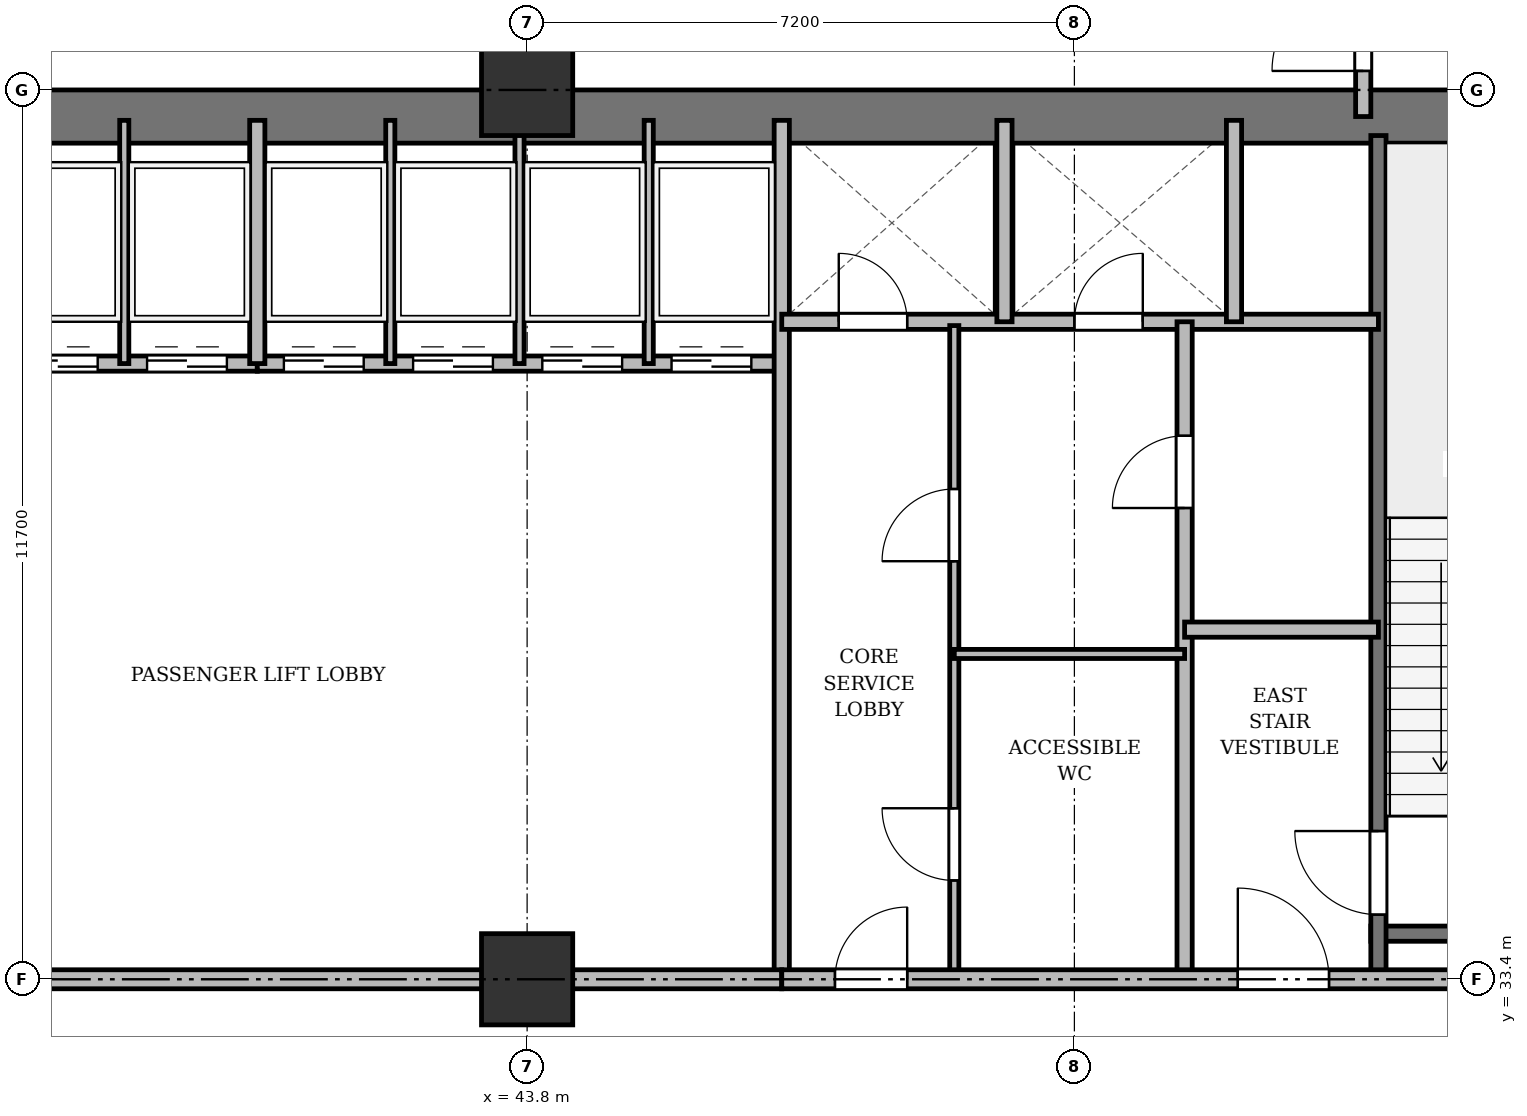
"""IFC4 building model, lengths in metres.
Left out: names, types, materials, properties, quantities, classifications, styles, units other than length and angle.
Written with IfcOpenShell. Run it as: python <this file> out.ifc"""

import sys

from ifc_helpers import new_model, si_unit, direction, frame, frame_2d, origin, origin_2d, place, context, subcontext, project, spatial, rectangle, extrude, source, transform, mapped, element, fill, save


model = new_model("IFC4")
c1 = context("Model", 3, precision=1e-05, world=origin(), true_north=direction((0.0, 1.0)))
c2 = subcontext(c1, "Body", "Model", "MODEL_VIEW")
j1 = project(units=[si_unit("LENGTHUNIT", "METRE"), si_unit("PLANEANGLEUNIT", "RADIAN")], contexts=[c1])
p1 = place(None, origin())
s1 = spatial("IfcSite", under=j1, at=p1, CompositionType="ELEMENT")
p2 = place(p1, origin())
s2 = spatial("IfcBuilding", under=s1, at=p2, CompositionType="ELEMENT")
p3 = place(p2, origin())
s3 = spatial("IfcBuildingStorey", under=s2, at=p3, CompositionType="ELEMENT", Elevation=0.0)
m1 = source(origin(), c2, "Body", "SweptSolid", [
    extrude(rectangle(XDim=1.2, YDim=1.2, at=origin_2d()), origin(), (0.0, 0.0, 1.0), 5.2),
])
for number, where, z_axis, x_axis in (
    (1, (43.8, 33.4, 0.0), (0.0, 0.0, 1.0), (1.0, 0.0, 0.0)),
    (2, (43.8, 45.1, 0.0), (0.0, 0.0, 1.0), (1.0, 0.0, 0.0)),
):
    element("IfcColumn", number, at=place(p3, frame(where, z_axis=z_axis, x_axis=x_axis)), inside=s3, PredefinedType="COLUMN", context=c2, shape_type="MappedRepresentation", body=[
        mapped(m1, transform((0.0, 0.0, 0.0), x_axis=(1.0, 0.0, 0.0), y_axis=(0.0, 1.0, 0.0), z_axis=(0.0, 0.0, 1.0), scale=1.0)),
    ])
p4 = place(p3, frame((15.5, 44.75, 0.0), z_axis=(0.0, 0.0, 1.0), x_axis=(1.0, 0.0, 0.0)))
e3 = element("IfcWall", 3, at=p4, inside=s3, PredefinedType="SHEAR", context=c2, shape_type="SweptSolid", body=[
    extrude(rectangle(XDim=43.4, YDim=0.7, at=frame_2d((21.7, 0.0))), origin(), (0.0, 0.0, 1.0), 4.88),
])
p5 = place(p3, frame((54.9, 34.0, 0.0), z_axis=(0.0, 0.0, 1.0), x_axis=(1.0, 0.0, 0.0)))
e4 = element("IfcWall", 4, at=p5, inside=s3, PredefinedType="SHEAR", context=c2, shape_type="SweptSolid", body=[
    extrude(rectangle(XDim=3.4, YDim=0.2, at=frame_2d((1.7, 0.0))), origin(), (0.0, 0.0, 1.0), 4.88),
])
p6 = place(p3, frame((55.0, 33.4, 0.0), z_axis=(0.0, 0.0, 1.0), x_axis=(0.0, 1.0, 0.0)))
e5 = element("IfcWall", 5, at=p6, inside=s3, PredefinedType="SHEAR", context=c2, shape_type="SweptSolid", body=[
    extrude(rectangle(XDim=11.1, YDim=0.2, at=frame_2d((5.55, 0.0))), origin(), (0.0, 0.0, 1.0), 4.88),
])
p7 = place(p6, frame((0.85, 0.0, 0.0)))
e6 = element("IfcOpeningElement", 6, at=p7, cuts=e5, PredefinedType="OPENING", context=c2, shape_type="SweptSolid", body=[
    extrude(rectangle(XDim=1.1, YDim=2.15, at=frame_2d((0.55, 1.075))), frame((0.0, 0.11, 0.0), z_axis=(0.0, -1.0, 0.0), x_axis=(1.0, 0.0, 0.0)), (0.0, 0.0, 1.0), 0.22),
])
p8 = place(p3, frame((33.35, 41.5, 0.0), z_axis=(0.0, 0.0, 1.0), x_axis=(1.0, 0.0, 0.0)))
e7 = element("IfcWall", 7, at=p8, inside=s3, PredefinedType="SOLIDWALL", context=c2, shape_type="SweptSolid", body=[
    extrude(rectangle(XDim=6.9, YDim=0.2, at=frame_2d((3.45, 0.0))), origin(), (0.0, 0.0, 1.0), 4.88),
])
p9 = place(p8, frame((0.35, 0.0, 0.0)))
e8 = element("IfcOpeningElement", 8, at=p9, cuts=e7, PredefinedType="OPENING", context=c2, shape_type="SweptSolid", body=[
    extrude(rectangle(XDim=1.05, YDim=2.15, at=frame_2d((0.525, 1.075))), frame((0.0, 0.11, 0.0), z_axis=(0.0, -1.0, 0.0), x_axis=(1.0, 0.0, 0.0)), (0.0, 0.0, 1.0), 0.22),
])
p10 = place(p8, frame((2.05, 0.0, 0.0)))
e9 = element("IfcOpeningElement", 9, at=p10, cuts=e7, PredefinedType="OPENING", context=c2, shape_type="SweptSolid", body=[
    extrude(rectangle(XDim=1.05, YDim=2.15, at=frame_2d((0.525, 1.075))), frame((0.0, 0.11, 0.0), z_axis=(0.0, -1.0, 0.0), x_axis=(1.0, 0.0, 0.0)), (0.0, 0.0, 1.0), 0.22),
])
p11 = place(p8, frame((3.75, 0.0, 0.0)))
e10 = element("IfcOpeningElement", 10, at=p11, cuts=e7, PredefinedType="OPENING", context=c2, shape_type="SweptSolid", body=[
    extrude(rectangle(XDim=1.05, YDim=2.15, at=frame_2d((0.525, 1.075))), frame((0.0, 0.11, 0.0), z_axis=(0.0, -1.0, 0.0), x_axis=(1.0, 0.0, 0.0)), (0.0, 0.0, 1.0), 0.22),
])
p12 = place(p8, frame((5.45, 0.0, 0.0)))
e11 = element("IfcOpeningElement", 11, at=p12, cuts=e7, PredefinedType="OPENING", context=c2, shape_type="SweptSolid", body=[
    extrude(rectangle(XDim=1.05, YDim=2.15, at=frame_2d((0.525, 1.075))), frame((0.0, 0.11, 0.0), z_axis=(0.0, -1.0, 0.0), x_axis=(1.0, 0.0, 0.0)), (0.0, 0.0, 1.0), 0.22),
])
p13 = place(p3, frame((38.5, 41.5, 0.0), z_axis=(0.0, 0.0, 1.0), x_axis=(0.0, 1.0, 0.0)))
e12 = element("IfcWall", 12, at=p13, inside=s3, PredefinedType="PARTITIONING", context=c2, shape_type="SweptSolid", body=[
    extrude(rectangle(XDim=3.2, YDim=0.12, at=frame_2d((1.6, 0.0))), origin(), (0.0, 0.0, 1.0), 4.88),
])
p14 = place(p3, frame((40.25, 41.5, 0.0), z_axis=(0.0, 0.0, 1.0), x_axis=(1.0, 0.0, 0.0)))
e13 = element("IfcWall", 13, at=p14, inside=s3, PredefinedType="SOLIDWALL", context=c2, shape_type="SweptSolid", body=[
    extrude(rectangle(XDim=6.9, YDim=0.2, at=frame_2d((3.45, 0.0))), origin(), (0.0, 0.0, 1.0), 4.08),
])
p15 = place(p14, frame((0.35, 0.0, 0.0)))
e14 = element("IfcOpeningElement", 14, at=p15, cuts=e13, PredefinedType="OPENING", context=c2, shape_type="SweptSolid", body=[
    extrude(rectangle(XDim=1.05, YDim=2.15, at=frame_2d((0.525, 1.075))), frame((0.0, 0.11, 0.0), z_axis=(0.0, -1.0, 0.0), x_axis=(1.0, 0.0, 0.0)), (0.0, 0.0, 1.0), 0.22),
])
p16 = place(p14, frame((2.05, 0.0, 0.0)))
e15 = element("IfcOpeningElement", 15, at=p16, cuts=e13, PredefinedType="OPENING", context=c2, shape_type="SweptSolid", body=[
    extrude(rectangle(XDim=1.05, YDim=2.15, at=frame_2d((0.525, 1.075))), frame((0.0, 0.11, 0.0), z_axis=(0.0, -1.0, 0.0), x_axis=(1.0, 0.0, 0.0)), (0.0, 0.0, 1.0), 0.22),
])
p17 = place(p14, frame((3.75, 0.0, 0.0)))
e16 = element("IfcOpeningElement", 16, at=p17, cuts=e13, PredefinedType="OPENING", context=c2, shape_type="SweptSolid", body=[
    extrude(rectangle(XDim=1.05, YDim=2.15, at=frame_2d((0.525, 1.075))), frame((0.0, 0.11, 0.0), z_axis=(0.0, -1.0, 0.0), x_axis=(1.0, 0.0, 0.0)), (0.0, 0.0, 1.0), 0.22),
])
p18 = place(p14, frame((5.45, 0.0, 0.0)))
e17 = element("IfcOpeningElement", 17, at=p18, cuts=e13, PredefinedType="OPENING", context=c2, shape_type="SweptSolid", body=[
    extrude(rectangle(XDim=1.05, YDim=2.15, at=frame_2d((0.525, 1.075))), frame((0.0, 0.11, 0.0), z_axis=(0.0, -1.0, 0.0), x_axis=(1.0, 0.0, 0.0)), (0.0, 0.0, 1.0), 0.22),
])
p19 = place(p3, frame((40.25, 41.5, 0.0), z_axis=(0.0, 0.0, 1.0), x_axis=(0.0, 1.0, 0.0)))
e18 = element("IfcWall", 18, at=p19, inside=s3, PredefinedType="SOLIDWALL", context=c2, shape_type="SweptSolid", body=[
    extrude(rectangle(XDim=3.2, YDim=0.2, at=frame_2d((1.6, 0.0))), origin(), (0.0, 0.0, 1.0), 4.88),
])
p20 = place(p3, frame((42.0, 41.5, 0.0), z_axis=(0.0, 0.0, 1.0), x_axis=(0.0, 1.0, 0.0)))
e19 = element("IfcWall", 19, at=p20, inside=s3, PredefinedType="PARTITIONING", context=c2, shape_type="SweptSolid", body=[
    extrude(rectangle(XDim=3.2, YDim=0.12, at=frame_2d((1.6, 0.0))), origin(), (0.0, 0.0, 1.0), 4.88),
])
p21 = place(p3, frame((43.7, 41.5, 0.0), z_axis=(0.0, 0.0, 1.0), x_axis=(0.0, 1.0, 0.0)))
e20 = element("IfcWall", 20, at=p21, inside=s3, PredefinedType="PARTITIONING", context=c2, shape_type="SweptSolid", body=[
    extrude(rectangle(XDim=3.2, YDim=0.12, at=frame_2d((1.6, 0.0))), origin(), (0.0, 0.0, 1.0), 4.08),
])
p22 = place(p3, frame((45.4, 41.5, 0.0), z_axis=(0.0, 0.0, 1.0), x_axis=(0.0, 1.0, 0.0)))
e21 = element("IfcWall", 21, at=p22, inside=s3, PredefinedType="PARTITIONING", context=c2, shape_type="SweptSolid", body=[
    extrude(rectangle(XDim=3.2, YDim=0.12, at=frame_2d((1.6, 0.0))), origin(), (0.0, 0.0, 1.0), 4.88),
])
p23 = place(p3, frame((47.15, 33.4, 0.0), z_axis=(0.0, 0.0, 1.0), x_axis=(0.0, 1.0, 0.0)))
e22 = element("IfcWall", 22, at=p23, inside=s3, PredefinedType="SOLIDWALL", context=c2, shape_type="SweptSolid", body=[
    extrude(rectangle(XDim=11.3, YDim=0.2, at=frame_2d((5.65, 0.0))), origin(), (0.0, 0.0, 1.0), 3.78),
])
p24 = place(p3, frame((26.3, 33.4, 0.0), z_axis=(0.0, 0.0, 1.0), x_axis=(1.0, 0.0, 0.0)))
e23 = element("IfcWall", 23, at=p24, inside=s3, PredefinedType="PARTITIONING", context=c2, shape_type="SweptSolid", body=[
    extrude(rectangle(XDim=20.85, YDim=0.25, at=frame_2d((10.425, 0.0))), origin(), (0.0, 0.0, 1.0), 3.78),
])
p25 = place(p24, frame((9.2, 0.0, 0.0)))
e24 = element("IfcOpeningElement", 24, at=p25, cuts=e23, PredefinedType="OPENING", context=c2, shape_type="SweptSolid", body=[
    extrude(rectangle(XDim=1.6, YDim=2.2, at=frame_2d((0.8, 1.1))), frame((0.0, 0.135, 0.0), z_axis=(0.0, -1.0, 0.0), x_axis=(1.0, 0.0, 0.0)), (0.0, 0.0, 1.0), 0.27),
])
p26 = place(p3, frame((47.15, 42.05, 0.0), z_axis=(0.0, 0.0, 1.0), x_axis=(1.0, 0.0, 0.0)))
e25 = element("IfcWall", 25, at=p26, inside=s3, PredefinedType="SOLIDWALL", context=c2, shape_type="SweptSolid", body=[
    extrude(rectangle(XDim=7.85, YDim=0.2, at=frame_2d((3.925, 0.0))), origin(), (0.0, 0.0, 1.0), 4.88),
])
p27 = place(p26, frame((0.75, 0.0, 0.0)))
e26 = element("IfcOpeningElement", 26, at=p27, cuts=e25, PredefinedType="OPENING", context=c2, shape_type="SweptSolid", body=[
    extrude(rectangle(XDim=0.9, YDim=2.1, at=frame_2d((0.45, 1.05))), frame((0.0, 0.11, 0.0), z_axis=(0.0, -1.0, 0.0), x_axis=(1.0, 0.0, 0.0)), (0.0, 0.0, 1.0), 0.22),
])
p28 = place(p26, frame((3.85, 0.0, 0.0)))
e27 = element("IfcOpeningElement", 27, at=p28, cuts=e25, PredefinedType="OPENING", context=c2, shape_type="SweptSolid", body=[
    extrude(rectangle(XDim=0.9, YDim=2.1, at=frame_2d((0.45, 1.05))), frame((0.0, 0.11, 0.0), z_axis=(0.0, -1.0, 0.0), x_axis=(1.0, 0.0, 0.0)), (0.0, 0.0, 1.0), 0.22),
])
for number, where, z_axis, x_axis in (
    (28, (50.08, 42.05, 0.0), (0.0, 0.0, 1.0), (0.0, 1.0, 0.0)),
    (29, (53.1, 42.05, 0.0), (0.0, 0.0, 1.0), (0.0, 1.0, 0.0)),
):
    element("IfcWall", number, at=place(p3, frame(where, z_axis=z_axis, x_axis=x_axis)), inside=s3, PredefinedType="SOLIDWALL", context=c2, shape_type="SweptSolid", body=[
        extrude(rectangle(XDim=2.65, YDim=0.2, at=frame_2d((1.325, 0.0))), origin(), (0.0, 0.0, 1.0), 4.88),
    ])
p29 = place(p3, frame((52.45, 33.4, 0.0), z_axis=(0.0, 0.0, 1.0), x_axis=(0.0, 1.0, 0.0)))
e30 = element("IfcWall", 30, at=p29, inside=s3, PredefinedType="PARTITIONING", context=c2, shape_type="SweptSolid", body=[
    extrude(rectangle(XDim=8.65, YDim=0.2, at=frame_2d((4.325, 0.0))), origin(), (0.0, 0.0, 1.0), 3.78),
])
p30 = place(p29, frame((6.2, 0.0, 0.0)))
e31 = element("IfcOpeningElement", 31, at=p30, cuts=e30, PredefinedType="OPENING", context=c2, shape_type="SweptSolid", body=[
    extrude(rectangle(XDim=0.95, YDim=2.15, at=frame_2d((0.475, 1.075))), frame((0.0, 0.11, 0.0), z_axis=(0.0, -1.0, 0.0), x_axis=(1.0, 0.0, 0.0)), (0.0, 0.0, 1.0), 0.22),
])
p31 = place(p3, frame((52.45, 38.0, 0.0), z_axis=(0.0, 0.0, 1.0), x_axis=(1.0, 0.0, 0.0)))
e32 = element("IfcWall", 32, at=p31, inside=s3, PredefinedType="PARTITIONING", context=c2, shape_type="SweptSolid", body=[
    extrude(rectangle(XDim=2.55, YDim=0.2, at=frame_2d((1.275, 0.0))), origin(), (0.0, 0.0, 1.0), 4.88),
])
p32 = place(p3, frame((49.42, 33.4, 0.0), z_axis=(0.0, 0.0, 1.0), x_axis=(0.0, 1.0, 0.0)))
e33 = element("IfcWall", 33, at=p32, inside=s3, PredefinedType="PARTITIONING", context=c2, shape_type="SweptSolid", body=[
    extrude(rectangle(XDim=8.6, YDim=0.12, at=frame_2d((4.3, 0.0))), origin(), (0.0, 0.0, 1.0), 3.78),
])
p33 = place(p32, frame((1.3, 0.0, 0.0)))
e34 = element("IfcOpeningElement", 34, at=p33, cuts=e33, PredefinedType="OPENING", context=c2, shape_type="SweptSolid", body=[
    extrude(rectangle(XDim=0.95, YDim=2.15, at=frame_2d((0.475, 1.075))), frame((0.0, 0.07, 0.0), z_axis=(0.0, -1.0, 0.0), x_axis=(1.0, 0.0, 0.0)), (0.0, 0.0, 1.0), 0.14),
])
p34 = place(p32, frame((5.5, 0.0, 0.0)))
e35 = element("IfcOpeningElement", 35, at=p34, cuts=e33, PredefinedType="OPENING", context=c2, shape_type="SweptSolid", body=[
    extrude(rectangle(XDim=0.95, YDim=2.15, at=frame_2d((0.475, 1.075))), frame((0.0, 0.07, 0.0), z_axis=(0.0, -1.0, 0.0), x_axis=(1.0, 0.0, 0.0)), (0.0, 0.0, 1.0), 0.14),
])
p35 = place(p3, frame((49.42, 37.68, 0.0), z_axis=(0.0, 0.0, 1.0), x_axis=(1.0, 0.0, 0.0)))
e36 = element("IfcWall", 36, at=p35, inside=s3, PredefinedType="PARTITIONING", context=c2, shape_type="SweptSolid", body=[
    extrude(rectangle(XDim=3.03, YDim=0.12, at=frame_2d((1.515, 0.0))), origin(), (0.0, 0.0, 1.0), 4.88),
])
p36 = place(p3, frame((47.15, 33.4, 0.0), z_axis=(0.0, 0.0, 1.0), x_axis=(1.0, 0.0, 0.0)))
e37 = element("IfcWall", 37, at=p36, inside=s3, PredefinedType="PARTITIONING", context=c2, shape_type="SweptSolid", body=[
    extrude(rectangle(XDim=11.15, YDim=0.25, at=frame_2d((5.575, 0.0))), origin(), (0.0, 0.0, 1.0), 3.78),
])
p37 = place(p36, frame((0.7, 0.0, 0.0)))
e38 = element("IfcOpeningElement", 38, at=p37, cuts=e37, PredefinedType="OPENING", context=c2, shape_type="SweptSolid", body=[
    extrude(rectangle(XDim=0.95, YDim=2.15, at=frame_2d((0.475, 1.075))), frame((0.0, 0.135, 0.0), z_axis=(0.0, -1.0, 0.0), x_axis=(1.0, 0.0, 0.0)), (0.0, 0.0, 1.0), 0.27),
])
p38 = place(p36, frame((6.0, 0.0, 0.0)))
e39 = element("IfcOpeningElement", 39, at=p38, cuts=e37, PredefinedType="OPENING", context=c2, shape_type="SweptSolid", body=[
    extrude(rectangle(XDim=1.2, YDim=2.15, at=frame_2d((0.6, 1.075))), frame((0.0, 0.135, 0.0), z_axis=(0.0, -1.0, 0.0), x_axis=(1.0, 0.0, 0.0)), (0.0, 0.0, 1.0), 0.27),
])
p39 = place(p3, frame((54.8, 44.75, 0.0), z_axis=(0.0, 0.0, 1.0), x_axis=(0.0, 1.0, 0.0)))
e40 = element("IfcWall", 40, at=p39, inside=s3, PredefinedType="PARTITIONING", context=c2, shape_type="SweptSolid", body=[
    extrude(rectangle(XDim=6.65, YDim=0.2, at=frame_2d((3.325, 0.0))), origin(), (0.0, 0.0, 1.0), 3.78),
])
p40 = place(p39, frame((0.6, 0.0, 0.0)))
e41 = element("IfcOpeningElement", 41, at=p40, cuts=e40, PredefinedType="OPENING", context=c2, shape_type="SweptSolid", body=[
    extrude(rectangle(XDim=1.2, YDim=2.15, at=frame_2d((0.6, 1.075))), frame((0.0, 0.11, 0.0), z_axis=(0.0, -1.0, 0.0), x_axis=(1.0, 0.0, 0.0)), (0.0, 0.0, 1.0), 0.22),
])
m2 = source(origin(), c2, "Body", "SweptSolid", [
    extrude(rectangle(XDim=1.1, YDim=2.15, at=frame_2d((0.55, 1.075))), frame((0.0, 0.025, 0.0), z_axis=(0.0, -1.0, 0.0), x_axis=(1.0, 0.0, 0.0)), (0.0, 0.0, 1.0), 0.05),
])
p41 = place(p7, origin())
e42 = element("IfcDoor", 42, at=p41, inside=s3, OperationType="SINGLE_SWING_RIGHT", PredefinedType="DOOR", context=c2, shape_type="MappedRepresentation", body=[
    mapped(m2, transform((0.0, 0.0, 0.0), x_axis=(1.0, 0.0, 0.0), y_axis=(0.0, 1.0, 0.0), z_axis=(0.0, 0.0, 1.0), scale=1.0)),
])
fill(e6, e42)
m3 = source(origin(), c2, "Body", "SweptSolid", [
    extrude(rectangle(XDim=1.05, YDim=2.15, at=frame_2d((0.525, 1.075))), frame((0.0, 0.025, 0.0), z_axis=(0.0, -1.0, 0.0), x_axis=(1.0, 0.0, 0.0)), (0.0, 0.0, 1.0), 0.05),
])
p42 = place(p11, origin())
e43 = element("IfcDoor", 43, at=p42, inside=s3, OperationType="DOUBLE_DOOR_SLIDING", PredefinedType="DOOR", context=c2, shape_type="MappedRepresentation", body=[
    mapped(m3, transform((0.0, 0.0, 0.0), x_axis=(1.0, 0.0, 0.0), y_axis=(0.0, 1.0, 0.0), z_axis=(0.0, 0.0, 1.0), scale=1.0)),
])
fill(e10, e43)
p43 = place(p12, origin())
e44 = element("IfcDoor", 44, at=p43, inside=s3, OperationType="DOUBLE_DOOR_SLIDING", PredefinedType="DOOR", context=c2, shape_type="MappedRepresentation", body=[
    mapped(m3, transform((0.0, 0.0, 0.0), x_axis=(1.0, 0.0, 0.0), y_axis=(0.0, 1.0, 0.0), z_axis=(0.0, 0.0, 1.0), scale=1.0)),
])
fill(e11, e44)
p44 = place(p15, origin())
e45 = element("IfcDoor", 45, at=p44, inside=s3, OperationType="DOUBLE_DOOR_SLIDING", PredefinedType="DOOR", context=c2, shape_type="MappedRepresentation", body=[
    mapped(m3, transform((0.0, 0.0, 0.0), x_axis=(1.0, 0.0, 0.0), y_axis=(0.0, 1.0, 0.0), z_axis=(0.0, 0.0, 1.0), scale=1.0)),
])
fill(e14, e45)
p45 = place(p16, origin())
e46 = element("IfcDoor", 46, at=p45, inside=s3, OperationType="DOUBLE_DOOR_SLIDING", PredefinedType="DOOR", context=c2, shape_type="MappedRepresentation", body=[
    mapped(m3, transform((0.0, 0.0, 0.0), x_axis=(1.0, 0.0, 0.0), y_axis=(0.0, 1.0, 0.0), z_axis=(0.0, 0.0, 1.0), scale=1.0)),
])
fill(e15, e46)
p46 = place(p17, origin())
e47 = element("IfcDoor", 47, at=p46, inside=s3, OperationType="DOUBLE_DOOR_SLIDING", PredefinedType="DOOR", context=c2, shape_type="MappedRepresentation", body=[
    mapped(m3, transform((0.0, 0.0, 0.0), x_axis=(1.0, 0.0, 0.0), y_axis=(0.0, 1.0, 0.0), z_axis=(0.0, 0.0, 1.0), scale=1.0)),
])
fill(e16, e47)
p47 = place(p18, origin())
e48 = element("IfcDoor", 48, at=p47, inside=s3, OperationType="DOUBLE_DOOR_SLIDING", PredefinedType="DOOR", context=c2, shape_type="MappedRepresentation", body=[
    mapped(m3, transform((0.0, 0.0, 0.0), x_axis=(1.0, 0.0, 0.0), y_axis=(0.0, 1.0, 0.0), z_axis=(0.0, 0.0, 1.0), scale=1.0)),
])
fill(e17, e48)
m4 = source(origin(), c2, "Body", "SweptSolid", [
    extrude(rectangle(XDim=0.9, YDim=2.1, at=frame_2d((0.45, 1.05))), frame((0.0, 0.025, 0.0), z_axis=(0.0, -1.0, 0.0), x_axis=(1.0, 0.0, 0.0)), (0.0, 0.0, 1.0), 0.05),
])
p48 = place(p27, origin())
e49 = element("IfcDoor", 49, at=p48, inside=s3, OperationType="SINGLE_SWING_LEFT", PredefinedType="DOOR", context=c2, shape_type="MappedRepresentation", body=[
    mapped(m4, transform((0.0, 0.0, 0.0), x_axis=(1.0, 0.0, 0.0), y_axis=(0.0, 1.0, 0.0), z_axis=(0.0, 0.0, 1.0), scale=1.0)),
])
fill(e26, e49)
p49 = place(p28, origin())
e50 = element("IfcDoor", 50, at=p49, inside=s3, OperationType="SINGLE_SWING_RIGHT", PredefinedType="DOOR", context=c2, shape_type="MappedRepresentation", body=[
    mapped(m4, transform((0.0, 0.0, 0.0), x_axis=(1.0, 0.0, 0.0), y_axis=(0.0, 1.0, 0.0), z_axis=(0.0, 0.0, 1.0), scale=1.0)),
])
fill(e27, e50)
m5 = source(origin(), c2, "Body", "SweptSolid", [
    extrude(rectangle(XDim=0.95, YDim=2.15, at=frame_2d((0.475, 1.075))), frame((0.0, 0.025, 0.0), z_axis=(0.0, -1.0, 0.0), x_axis=(1.0, 0.0, 0.0)), (0.0, 0.0, 1.0), 0.05),
])
p50 = place(p30, origin())
e51 = element("IfcDoor", 51, at=p50, inside=s3, OperationType="SINGLE_SWING_LEFT", PredefinedType="DOOR", context=c2, shape_type="MappedRepresentation", body=[
    mapped(m5, transform((0.0, 0.0, 0.0), x_axis=(1.0, 0.0, 0.0), y_axis=(0.0, 1.0, 0.0), z_axis=(0.0, 0.0, 1.0), scale=1.0)),
])
fill(e31, e51)
p51 = place(p33, origin())
e52 = element("IfcDoor", 52, at=p51, inside=s3, OperationType="SINGLE_SWING_RIGHT", PredefinedType="DOOR", context=c2, shape_type="MappedRepresentation", body=[
    mapped(m5, transform((0.0, 0.0, 0.0), x_axis=(1.0, 0.0, 0.0), y_axis=(0.0, 1.0, 0.0), z_axis=(0.0, 0.0, 1.0), scale=1.0)),
])
fill(e34, e52)
p52 = place(p34, origin())
e53 = element("IfcDoor", 53, at=p52, inside=s3, OperationType="SINGLE_SWING_LEFT", PredefinedType="DOOR", context=c2, shape_type="MappedRepresentation", body=[
    mapped(m5, transform((0.0, 0.0, 0.0), x_axis=(1.0, 0.0, 0.0), y_axis=(0.0, 1.0, 0.0), z_axis=(0.0, 0.0, 1.0), scale=1.0)),
])
fill(e35, e53)
p53 = place(p37, origin())
e54 = element("IfcDoor", 54, at=p53, inside=s3, OperationType="SINGLE_SWING_RIGHT", PredefinedType="DOOR", context=c2, shape_type="MappedRepresentation", body=[
    mapped(m5, transform((0.0, 0.0, 0.0), x_axis=(1.0, 0.0, 0.0), y_axis=(0.0, 1.0, 0.0), z_axis=(0.0, 0.0, 1.0), scale=1.0)),
])
fill(e38, e54)
m6 = source(origin(), c2, "Body", "SweptSolid", [
    extrude(rectangle(XDim=1.2, YDim=2.15, at=frame_2d((0.6, 1.075))), frame((0.0, 0.025, 0.0), z_axis=(0.0, -1.0, 0.0), x_axis=(1.0, 0.0, 0.0)), (0.0, 0.0, 1.0), 0.05),
])
p54 = place(p38, origin())
e55 = element("IfcDoor", 55, at=p54, inside=s3, OperationType="SINGLE_SWING_LEFT", PredefinedType="DOOR", context=c2, shape_type="MappedRepresentation", body=[
    mapped(m6, transform((0.0, 0.0, 0.0), x_axis=(1.0, 0.0, 0.0), y_axis=(0.0, 1.0, 0.0), z_axis=(0.0, 0.0, 1.0), scale=1.0)),
])
fill(e39, e55)
p55 = place(p40, origin())
e56 = element("IfcDoor", 56, at=p55, inside=s3, OperationType="SINGLE_SWING_LEFT", PredefinedType="DOOR", context=c2, shape_type="MappedRepresentation", body=[
    mapped(m6, transform((0.0, 0.0, 0.0), x_axis=(1.0, 0.0, 0.0), y_axis=(0.0, 1.0, 0.0), z_axis=(0.0, 0.0, 1.0), scale=1.0)),
])
fill(e41, e56)
save(model, sys.argv[1])
